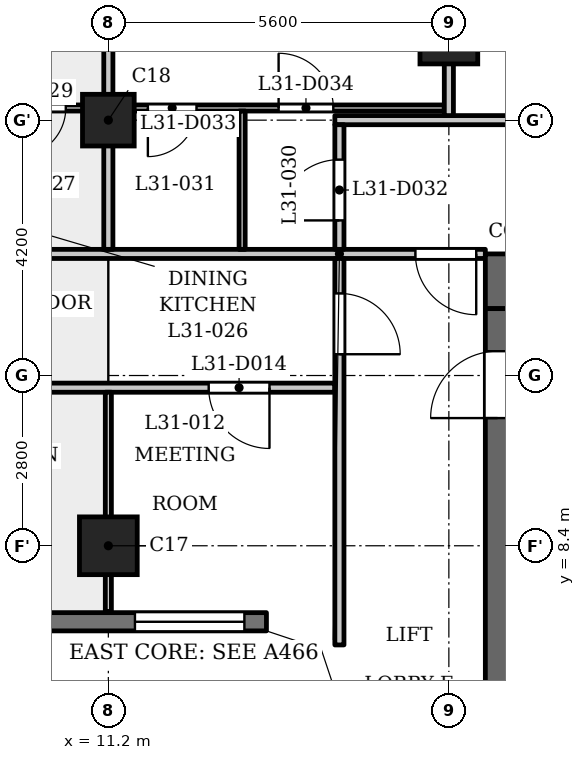
"""IFC4 building model, lengths in metres.
Left out: names, types, materials, properties, quantities, classifications, styles, units other than length and angle.
Written with IfcOpenShell. Run it as: python <this file> out.ifc"""

import sys

from ifc_helpers import new_model, si_unit, direction, frame, frame_2d, origin, origin_2d, place, context, subcontext, project, spatial, polyline, rectangle, outline, extrude, element, fill, save


model = new_model("IFC4")
c1 = context("Model", 3, precision=1e-05, world=origin(), true_north=direction((0.0, 1.0)))
c2 = subcontext(c1, "Body", "Model", "MODEL_VIEW")
j1 = project(units=[si_unit("LENGTHUNIT", "METRE"), si_unit("PLANEANGLEUNIT", "RADIAN")], contexts=[c1])
p1 = place(None, origin())
s1 = spatial("IfcSite", under=j1, at=p1, CompositionType="ELEMENT")
p2 = place(p1, origin())
s2 = spatial("IfcBuilding", under=s1, at=p2, CompositionType="ELEMENT")
p3 = place(p2, frame((0.0, 0.0, 121.8)))
s3 = spatial("IfcBuildingStorey", under=s2, at=p3, CompositionType="ELEMENT", Elevation=121.8)
for number, where, z_axis, x_axis in (
    (1, (11.2, 8.4, 0.0), (0.0, 0.0, 1.0), (1.0, 0.0, 0.0)),
    (2, (16.8, 16.8, 0.0), (0.0, 0.0, 1.0), (1.0, 0.0, 0.0)),
):
    element("IfcColumn", number, at=place(p3, frame(where, z_axis=z_axis, x_axis=x_axis)), inside=s3, PredefinedType="COLUMN", context=c2, shape_type="SweptSolid", body=[
        extrude(rectangle(XDim=0.95, YDim=0.95, at=origin_2d()), origin(), (0.0, 0.0, 1.0), 3.5),
    ])
p4 = place(p3, frame((11.2, 15.4, 0.0), z_axis=(0.0, 0.0, 1.0), x_axis=(1.0, 0.0, 0.0)))
e3 = element("IfcColumn", 3, at=p4, inside=s3, PredefinedType="COLUMN", context=c2, shape_type="SweptSolid", body=[
    extrude(rectangle(XDim=0.85, YDim=0.85, at=origin_2d()), origin(), (0.0, 0.0, 1.0), 3.5),
])
p5 = place(p3, frame((-13.8, 7.15, 0.0), z_axis=(0.0, 0.0, 1.0), x_axis=(1.0, 0.0, 0.0)))
e4 = element("IfcWall", 4, at=p5, inside=s3, PredefinedType="SOLIDWALL", context=c2, shape_type="SweptSolid", body=[
    extrude(rectangle(XDim=27.6, YDim=0.3, at=frame_2d((13.8, 0.0))), origin(), (0.0, 0.0, 1.0), 3.15),
])
p6 = place(p5, frame((0.363, 0.0, 0.9)))
e5 = element("IfcOpeningElement", 5, at=p6, cuts=e4, PredefinedType="OPENING", context=c2, shape_type="SweptSolid", body=[
    extrude(rectangle(XDim=1.8, YDim=1.25, at=frame_2d((0.9, 0.625))), frame((0.0, 0.16, 0.0), z_axis=(0.0, -1.0, 0.0), x_axis=(1.0, 0.0, 0.0)), (0.0, 0.0, 1.0), 0.32),
])
p7 = place(p5, frame((3.6, 0.0, 1.2)))
e6 = element("IfcOpeningElement", 6, at=p7, cuts=e4, PredefinedType="OPENING", context=c2, shape_type="SweptSolid", body=[
    extrude(rectangle(XDim=3.6, YDim=0.95, at=frame_2d((1.8, 0.475))), frame((0.0, 0.16, 0.0), z_axis=(0.0, -1.0, 0.0), x_axis=(1.0, 0.0, 0.0)), (0.0, 0.0, 1.0), 0.32),
])
p8 = place(p5, frame((9.2, 0.0, 1.2)))
e7 = element("IfcOpeningElement", 7, at=p8, cuts=e4, PredefinedType="OPENING", context=c2, shape_type="SweptSolid", body=[
    extrude(rectangle(XDim=3.6, YDim=0.95, at=frame_2d((1.8, 0.475))), frame((0.0, 0.16, 0.0), z_axis=(0.0, -1.0, 0.0), x_axis=(1.0, 0.0, 0.0)), (0.0, 0.0, 1.0), 0.32),
])
p9 = place(p5, frame((14.8, 0.0, 1.2)))
e8 = element("IfcOpeningElement", 8, at=p9, cuts=e4, PredefinedType="OPENING", context=c2, shape_type="SweptSolid", body=[
    extrude(rectangle(XDim=3.6, YDim=0.95, at=frame_2d((1.8, 0.475))), frame((0.0, 0.16, 0.0), z_axis=(0.0, -1.0, 0.0), x_axis=(1.0, 0.0, 0.0)), (0.0, 0.0, 1.0), 0.32),
])
p10 = place(p5, frame((20.4, 0.0, 1.2)))
e9 = element("IfcOpeningElement", 9, at=p10, cuts=e4, PredefinedType="OPENING", context=c2, shape_type="SweptSolid", body=[
    extrude(rectangle(XDim=3.6, YDim=0.95, at=frame_2d((1.8, 0.475))), frame((0.0, 0.16, 0.0), z_axis=(0.0, -1.0, 0.0), x_axis=(1.0, 0.0, 0.0)), (0.0, 0.0, 1.0), 0.32),
])
p11 = place(p5, frame((25.438, 0.0, 0.9)))
e10 = element("IfcOpeningElement", 10, at=p11, cuts=e4, PredefinedType="OPENING", context=c2, shape_type="SweptSolid", body=[
    extrude(rectangle(XDim=1.8, YDim=1.25, at=frame_2d((0.9, 0.625))), frame((0.0, 0.16, 0.0), z_axis=(0.0, -1.0, 0.0), x_axis=(1.0, 0.0, 0.0)), (0.0, 0.0, 1.0), 0.32),
])
p12 = place(p3, frame((17.4, 12.75, 0.0), z_axis=(0.0, 0.0, 1.0), x_axis=(1.0, 0.0, 0.0)))
e11 = element("IfcWall", 11, at=p12, inside=s3, PredefinedType="SHEAR", context=c2, shape_type="SweptSolid", body=[
    extrude(rectangle(XDim=10.4, YDim=0.9, at=frame_2d((5.2, 0.0))), origin(), (0.0, 0.0, 1.0), 3.15),
])
p13 = place(p3, frame((17.6, -12.3, 0.0), z_axis=(0.0, 0.0, 1.0), x_axis=(0.0, 1.0, 0.0)))
e12 = element("IfcWall", 12, at=p13, inside=s3, PredefinedType="SHEAR", context=c2, shape_type="SweptSolid", body=[
    extrude(rectangle(XDim=24.6, YDim=0.4, at=frame_2d((12.3, 0.0))), origin(), (0.0, 0.0, 1.0), 3.15),
])
p14 = place(p13, frame((6.0, 0.0, 0.0)))
e13 = element("IfcOpeningElement", 13, at=p14, cuts=e12, PredefinedType="OPENING", context=c2, shape_type="SweptSolid", body=[
    extrude(rectangle(XDim=1.1, YDim=2.1, at=frame_2d((0.55, 1.05))), frame((0.0, 0.21, 0.0), z_axis=(0.0, -1.0, 0.0), x_axis=(1.0, 0.0, 0.0)), (0.0, 0.0, 1.0), 0.42),
])
p15 = place(p13, frame((8.4, 0.0, 0.0)))
e14 = element("IfcOpeningElement", 14, at=p15, cuts=e12, PredefinedType="OPENING", context=c2, shape_type="SweptSolid", body=[
    extrude(rectangle(XDim=1.1, YDim=2.1, at=frame_2d((0.55, 1.05))), frame((0.0, 0.21, 0.0), z_axis=(0.0, -1.0, 0.0), x_axis=(1.0, 0.0, 0.0)), (0.0, 0.0, 1.0), 0.42),
])
p16 = place(p13, frame((10.8, 0.0, 0.0)))
e15 = element("IfcOpeningElement", 15, at=p16, cuts=e12, PredefinedType="OPENING", context=c2, shape_type="SweptSolid", body=[
    extrude(rectangle(XDim=1.1, YDim=2.1, at=frame_2d((0.55, 1.05))), frame((0.0, 0.21, 0.0), z_axis=(0.0, -1.0, 0.0), x_axis=(1.0, 0.0, 0.0)), (0.0, 0.0, 1.0), 0.42),
])
p17 = place(p13, frame((22.8, 0.0, 0.0)))
e16 = element("IfcOpeningElement", 16, at=p17, cuts=e12, PredefinedType="OPENING", context=c2, shape_type="SweptSolid", body=[
    extrude(rectangle(XDim=1.1, YDim=2.1, at=frame_2d((0.55, 1.05))), frame((0.0, 0.21, 0.0), z_axis=(0.0, -1.0, 0.0), x_axis=(1.0, 0.0, 0.0)), (0.0, 0.0, 1.0), 0.42),
])
p18 = place(p13, frame((0.7, 0.0, 0.0)))
e17 = element("IfcOpeningElement", 17, at=p18, cuts=e12, PredefinedType="OPENING", context=c2, shape_type="SweptSolid", body=[
    extrude(rectangle(XDim=1.1, YDim=2.1, at=frame_2d((0.55, 1.05))), frame((0.0, 0.21, 0.0), z_axis=(0.0, -1.0, 0.0), x_axis=(1.0, 0.0, 0.0)), (0.0, 0.0, 1.0), 0.42),
])
p19 = place(p13, frame((12.775, 0.0, 0.0)))
e18 = element("IfcOpeningElement", 18, at=p19, cuts=e12, PredefinedType="OPENING", context=c2, shape_type="SweptSolid", body=[
    extrude(rectangle(XDim=1.8, YDim=2.1, at=frame_2d((0.9, 1.05))), frame((0.0, 0.21, 0.0), z_axis=(0.0, -1.0, 0.0), x_axis=(1.0, 0.0, 0.0)), (0.0, 0.0, 1.0), 0.42),
])
p20 = place(p3, frame((-14.925, 11.0, 0.0), z_axis=(0.0, 0.0, 1.0), x_axis=(1.0, 0.0, 0.0)))
e19 = element("IfcWall", 19, at=p20, inside=s3, PredefinedType="PARTITIONING", context=c2, shape_type="SweptSolid", body=[
    extrude(rectangle(XDim=29.85, YDim=0.15, at=frame_2d((14.925, 0.0))), origin(), (0.0, 0.0, 1.0), 3.15),
])
p21 = place(p20, frame((1.076, 0.0, 0.0)))
e20 = element("IfcOpeningElement", 20, at=p21, cuts=e19, PredefinedType="OPENING", context=c2, shape_type="SweptSolid", body=[
    extrude(rectangle(XDim=1.0, YDim=2.1, at=frame_2d((0.5, 1.05))), frame((0.0, 0.085, 0.0), z_axis=(0.0, -1.0, 0.0), x_axis=(1.0, 0.0, 0.0)), (0.0, 0.0, 1.0), 0.17),
])
p22 = place(p20, frame((7.625, 0.0, 0.0)))
e21 = element("IfcOpeningElement", 21, at=p22, cuts=e19, PredefinedType="OPENING", context=c2, shape_type="SweptSolid", body=[
    extrude(rectangle(XDim=1.0, YDim=2.1, at=frame_2d((0.5, 1.05))), frame((0.0, 0.085, 0.0), z_axis=(0.0, -1.0, 0.0), x_axis=(1.0, 0.0, 0.0)), (0.0, 0.0, 1.0), 0.17),
])
p23 = place(p20, frame((9.975, 0.0, 0.0)))
e22 = element("IfcOpeningElement", 22, at=p23, cuts=e19, PredefinedType="OPENING", context=c2, shape_type="SweptSolid", body=[
    extrude(rectangle(XDim=1.0, YDim=2.1, at=frame_2d((0.5, 1.05))), frame((0.0, 0.085, 0.0), z_axis=(0.0, -1.0, 0.0), x_axis=(1.0, 0.0, 0.0)), (0.0, 0.0, 1.0), 0.17),
])
p24 = place(p20, frame((18.825, 0.0, 0.0)))
e23 = element("IfcOpeningElement", 23, at=p24, cuts=e19, PredefinedType="OPENING", context=c2, shape_type="SweptSolid", body=[
    extrude(rectangle(XDim=1.0, YDim=2.1, at=frame_2d((0.5, 1.05))), frame((0.0, 0.085, 0.0), z_axis=(0.0, -1.0, 0.0), x_axis=(1.0, 0.0, 0.0)), (0.0, 0.0, 1.0), 0.17),
])
p25 = place(p20, frame((21.175, 0.0, 0.0)))
e24 = element("IfcOpeningElement", 24, at=p25, cuts=e19, PredefinedType="OPENING", context=c2, shape_type="SweptSolid", body=[
    extrude(rectangle(XDim=1.0, YDim=2.1, at=frame_2d((0.5, 1.05))), frame((0.0, 0.085, 0.0), z_axis=(0.0, -1.0, 0.0), x_axis=(1.0, 0.0, 0.0)), (0.0, 0.0, 1.0), 0.17),
])
p26 = place(p20, frame((27.775, 0.0, 0.0)))
e25 = element("IfcOpeningElement", 25, at=p26, cuts=e19, PredefinedType="OPENING", context=c2, shape_type="SweptSolid", body=[
    extrude(rectangle(XDim=1.0, YDim=2.1, at=frame_2d((0.5, 1.05))), frame((0.0, 0.085, 0.0), z_axis=(0.0, -1.0, 0.0), x_axis=(1.0, 0.0, 0.0)), (0.0, 0.0, 1.0), 0.17),
])
p27 = place(p3, frame((-17.4, 13.2, 0.0), z_axis=(0.0, 0.0, 1.0), x_axis=(1.0, 0.0, 0.0)))
e26 = element("IfcWall", 26, at=p27, inside=s3, PredefinedType="PARTITIONING", context=c2, shape_type="SweptSolid", body=[
    extrude(rectangle(XDim=34.8, YDim=0.15, at=frame_2d((17.4, 0.0))), origin(), (0.0, 0.0, 1.0), 3.15),
])
p28 = place(p27, frame((0.25, 0.0, 0.0)))
e27 = element("IfcOpeningElement", 27, at=p28, cuts=e26, PredefinedType="OPENING", context=c2, shape_type="SweptSolid", body=[
    extrude(rectangle(XDim=1.0, YDim=2.1, at=frame_2d((0.5, 1.05))), frame((0.0, 0.085, 0.0), z_axis=(0.0, -1.0, 0.0), x_axis=(1.0, 0.0, 0.0)), (0.0, 0.0, 1.0), 0.17),
])
p29 = place(p27, frame((33.65, 0.0, 0.0)))
e28 = element("IfcOpeningElement", 28, at=p29, cuts=e26, PredefinedType="OPENING", context=c2, shape_type="SweptSolid", body=[
    extrude(rectangle(XDim=1.0, YDim=2.1, at=frame_2d((0.5, 1.05))), frame((0.0, 0.085, 0.0), z_axis=(0.0, -1.0, 0.0), x_axis=(1.0, 0.0, 0.0)), (0.0, 0.0, 1.0), 0.17),
])
p30 = place(p27, frame((15.75, 0.0, 0.0)))
e29 = element("IfcOpeningElement", 29, at=p30, cuts=e26, PredefinedType="OPENING", context=c2, shape_type="SweptSolid", body=[
    extrude(rectangle(XDim=1.0, YDim=2.1, at=frame_2d((0.5, 1.05))), frame((0.0, 0.085, 0.0), z_axis=(0.0, -1.0, 0.0), x_axis=(1.0, 0.0, 0.0)), (0.0, 0.0, 1.0), 0.17),
])
p31 = place(p27, frame((18.1, 0.0, 0.0)))
e30 = element("IfcOpeningElement", 30, at=p31, cuts=e26, PredefinedType="OPENING", context=c2, shape_type="SweptSolid", body=[
    extrude(rectangle(XDim=1.0, YDim=2.1, at=frame_2d((0.5, 1.05))), frame((0.0, 0.085, 0.0), z_axis=(0.0, -1.0, 0.0), x_axis=(1.0, 0.0, 0.0)), (0.0, 0.0, 1.0), 0.17),
])
p32 = place(p27, frame((23.55, 0.0, 0.0)))
e31 = element("IfcOpeningElement", 31, at=p32, cuts=e26, PredefinedType="OPENING", context=c2, shape_type="SweptSolid", body=[
    extrude(rectangle(XDim=1.0, YDim=2.1, at=frame_2d((0.5, 1.05))), frame((0.0, 0.085, 0.0), z_axis=(0.0, -1.0, 0.0), x_axis=(1.0, 0.0, 0.0)), (0.0, 0.0, 1.0), 0.17),
])
p33 = place(p3, frame((14.925, 15.4, 0.0), z_axis=(0.0, 0.0, 1.0), x_axis=(1.0, 0.0, 0.0)))
e32 = element("IfcWall", 32, at=p33, inside=s3, PredefinedType="PARTITIONING", context=c2, shape_type="SweptSolid", body=[
    extrude(rectangle(XDim=12.559, YDim=0.15, at=frame_2d((6.279, 0.0))), origin(), (0.0, 0.0, 1.0), 3.15),
])
p34 = place(p33, frame((5.825, 0.0, 0.0)))
e33 = element("IfcOpeningElement", 33, at=p34, cuts=e32, PredefinedType="OPENING", context=c2, shape_type="SweptSolid", body=[
    extrude(rectangle(XDim=1.0, YDim=2.1, at=frame_2d((0.5, 1.05))), frame((0.0, 0.085, 0.0), z_axis=(0.0, -1.0, 0.0), x_axis=(1.0, 0.0, 0.0)), (0.0, 0.0, 1.0), 0.17),
])
p35 = place(p3, frame((-16.725, 15.6, 0.0), z_axis=(0.0, 0.0, 1.0), x_axis=(1.0, 0.0, 0.0)))
e34 = element("IfcWall", 34, at=p35, inside=s3, PredefinedType="PARTITIONING", context=c2, shape_type="SweptSolid", body=[
    extrude(rectangle(XDim=33.45, YDim=0.1, at=frame_2d((16.725, 0.0))), origin(), (0.0, 0.0, 1.0), 3.15),
])
p36 = place(p35, frame((9.425, 0.0, 0.0)))
e35 = element("IfcOpeningElement", 35, at=p36, cuts=e34, PredefinedType="OPENING", context=c2, shape_type="SweptSolid", body=[
    extrude(rectangle(XDim=0.8, YDim=2.1, at=frame_2d((0.4, 1.05))), frame((0.0, 0.06, 0.0), z_axis=(0.0, -1.0, 0.0), x_axis=(1.0, 0.0, 0.0)), (0.0, 0.0, 1.0), 0.12),
])
p37 = place(p35, frame((6.975, 0.0, 0.0)))
e36 = element("IfcOpeningElement", 36, at=p37, cuts=e34, PredefinedType="OPENING", context=c2, shape_type="SweptSolid", body=[
    extrude(rectangle(XDim=0.9, YDim=2.1, at=frame_2d((0.45, 1.05))), frame((0.0, 0.06, 0.0), z_axis=(0.0, -1.0, 0.0), x_axis=(1.0, 0.0, 0.0)), (0.0, 0.0, 1.0), 0.12),
])
p38 = place(p35, frame((1.875, 0.0, 0.0)))
e37 = element("IfcOpeningElement", 37, at=p38, cuts=e34, PredefinedType="OPENING", context=c2, shape_type="SweptSolid", body=[
    extrude(rectangle(XDim=0.9, YDim=2.1, at=frame_2d((0.45, 1.05))), frame((0.0, 0.06, 0.0), z_axis=(0.0, -1.0, 0.0), x_axis=(1.0, 0.0, 0.0)), (0.0, 0.0, 1.0), 0.12),
])
p39 = place(p35, frame((3.475, 0.0, 0.0)))
e38 = element("IfcOpeningElement", 38, at=p39, cuts=e34, PredefinedType="OPENING", context=c2, shape_type="SweptSolid", body=[
    extrude(rectangle(XDim=0.9, YDim=2.1, at=frame_2d((0.45, 1.05))), frame((0.0, 0.06, 0.0), z_axis=(0.0, -1.0, 0.0), x_axis=(1.0, 0.0, 0.0)), (0.0, 0.0, 1.0), 0.12),
])
p40 = place(p35, frame((11.775, 0.0, 0.0)))
e39 = element("IfcOpeningElement", 39, at=p40, cuts=e34, PredefinedType="OPENING", context=c2, shape_type="SweptSolid", body=[
    extrude(rectangle(XDim=0.8, YDim=2.1, at=frame_2d((0.4, 1.05))), frame((0.0, 0.06, 0.0), z_axis=(0.0, -1.0, 0.0), x_axis=(1.0, 0.0, 0.0)), (0.0, 0.0, 1.0), 0.12),
])
p41 = place(p35, frame((14.175, 0.0, 0.0)))
e40 = element("IfcOpeningElement", 40, at=p41, cuts=e34, PredefinedType="OPENING", context=c2, shape_type="SweptSolid", body=[
    extrude(rectangle(XDim=0.9, YDim=2.1, at=frame_2d((0.45, 1.05))), frame((0.0, 0.06, 0.0), z_axis=(0.0, -1.0, 0.0), x_axis=(1.0, 0.0, 0.0)), (0.0, 0.0, 1.0), 0.12),
])
p42 = place(p35, frame((20.725, 0.0, 0.0)))
e41 = element("IfcOpeningElement", 41, at=p42, cuts=e34, PredefinedType="OPENING", context=c2, shape_type="SweptSolid", body=[
    extrude(rectangle(XDim=0.8, YDim=2.1, at=frame_2d((0.4, 1.05))), frame((0.0, 0.06, 0.0), z_axis=(0.0, -1.0, 0.0), x_axis=(1.0, 0.0, 0.0)), (0.0, 0.0, 1.0), 0.12),
])
p43 = place(p35, frame((18.375, 0.0, 0.0)))
e42 = element("IfcOpeningElement", 42, at=p43, cuts=e34, PredefinedType="OPENING", context=c2, shape_type="SweptSolid", body=[
    extrude(rectangle(XDim=0.9, YDim=2.1, at=frame_2d((0.45, 1.05))), frame((0.0, 0.06, 0.0), z_axis=(0.0, -1.0, 0.0), x_axis=(1.0, 0.0, 0.0)), (0.0, 0.0, 1.0), 0.12),
])
p44 = place(p35, frame((26.425, 0.0, 0.0)))
e43 = element("IfcOpeningElement", 43, at=p44, cuts=e34, PredefinedType="OPENING", context=c2, shape_type="SweptSolid", body=[
    extrude(rectangle(XDim=0.8, YDim=2.1, at=frame_2d((0.4, 1.05))), frame((0.0, 0.06, 0.0), z_axis=(0.0, -1.0, 0.0), x_axis=(1.0, 0.0, 0.0)), (0.0, 0.0, 1.0), 0.12),
])
p45 = place(p35, frame((23.875, 0.0, 0.0)))
e44 = element("IfcOpeningElement", 44, at=p45, cuts=e34, PredefinedType="OPENING", context=c2, shape_type="SweptSolid", body=[
    extrude(rectangle(XDim=0.9, YDim=2.1, at=frame_2d((0.45, 1.05))), frame((0.0, 0.06, 0.0), z_axis=(0.0, -1.0, 0.0), x_axis=(1.0, 0.0, 0.0)), (0.0, 0.0, 1.0), 0.12),
])
p46 = place(p35, frame((28.575, 0.0, 0.0)))
e45 = element("IfcOpeningElement", 45, at=p46, cuts=e34, PredefinedType="OPENING", context=c2, shape_type="SweptSolid", body=[
    extrude(rectangle(XDim=0.8, YDim=2.1, at=frame_2d((0.4, 1.05))), frame((0.0, 0.06, 0.0), z_axis=(0.0, -1.0, 0.0), x_axis=(1.0, 0.0, 0.0)), (0.0, 0.0, 1.0), 0.12),
])
p47 = place(p35, frame((30.725, 0.0, 0.0)))
e46 = element("IfcOpeningElement", 46, at=p47, cuts=e34, PredefinedType="OPENING", context=c2, shape_type="SweptSolid", body=[
    extrude(rectangle(XDim=0.9, YDim=2.1, at=frame_2d((0.45, 1.05))), frame((0.0, 0.06, 0.0), z_axis=(0.0, -1.0, 0.0), x_axis=(1.0, 0.0, 0.0)), (0.0, 0.0, 1.0), 0.12),
])
p48 = place(p3, frame((11.2, 7.32, 0.0), z_axis=(0.0, 0.0, 1.0), x_axis=(0.0, 1.0, 0.0)))
e47 = element("IfcWall", 47, at=p48, inside=s3, PredefinedType="PARTITIONING", context=c2, shape_type="SweptSolid", body=[
    extrude(rectangle(XDim=3.605, YDim=0.1, at=frame_2d((1.802, 0.0))), origin(), (0.0, 0.0, 1.0), 3.15),
])
p49 = place(p3, frame((11.2, 13.275, 0.0), z_axis=(0.0, 0.0, 1.0), x_axis=(0.0, 1.0, 0.0)))
e48 = element("IfcWall", 48, at=p49, inside=s3, PredefinedType="PARTITIONING", context=c2, shape_type="SweptSolid", body=[
    extrude(rectangle(XDim=2.275, YDim=0.15, at=frame_2d((1.138, 0.0))), origin(), (0.0, 0.0, 1.0), 3.15),
])
p50 = place(p3, frame((11.2, 15.65, 0.0), z_axis=(0.0, 0.0, 1.0), x_axis=(0.0, 1.0, 0.0)))
e49 = element("IfcWall", 49, at=p50, inside=s3, PredefinedType="PARTITIONING", context=c2, shape_type="SweptSolid", body=[
    extrude(rectangle(XDim=7.33, YDim=0.15, at=frame_2d((3.665, 0.0))), origin(), (0.0, 0.0, 1.0), 3.15),
])
p51 = place(p3, frame((13.4, 13.275, 0.0), z_axis=(0.0, 0.0, 1.0), x_axis=(0.0, 1.0, 0.0)))
e50 = element("IfcWall", 50, at=p51, inside=s3, PredefinedType="PARTITIONING", context=c2, shape_type="SweptSolid", body=[
    extrude(rectangle(XDim=2.275, YDim=0.1, at=frame_2d((1.138, 0.0))), origin(), (0.0, 0.0, 1.0), 3.15),
])
p52 = place(p3, frame((15.0, 6.769, 0.0), z_axis=(0.0, 0.0, 1.0), x_axis=(0.0, 1.0, 0.0)))
e51 = element("IfcWall", 51, at=p52, inside=s3, PredefinedType="PARTITIONING", context=c2, shape_type="SweptSolid", body=[
    extrude(rectangle(XDim=6.356, YDim=0.15, at=frame_2d((3.178, 0.0))), origin(), (0.0, 0.0, 1.0), 3.15),
])
p53 = place(p52, frame((4.781, 0.0, 0.0)))
e52 = element("IfcOpeningElement", 52, at=p53, cuts=e51, PredefinedType="OPENING", context=c2, shape_type="SweptSolid", body=[
    extrude(rectangle(XDim=1.0, YDim=2.1, at=frame_2d((0.5, 1.05))), frame((0.0, 0.085, 0.0), z_axis=(0.0, -1.0, 0.0), x_axis=(1.0, 0.0, 0.0)), (0.0, 0.0, 1.0), 0.17),
])
p54 = place(p3, frame((15.0, 13.275, 0.0), z_axis=(0.0, 0.0, 1.0), x_axis=(0.0, 1.0, 0.0)))
e53 = element("IfcWall", 53, at=p54, inside=s3, PredefinedType="PARTITIONING", context=c2, shape_type="SweptSolid", body=[
    extrude(rectangle(XDim=2.05, YDim=0.15, at=frame_2d((1.025, 0.0))), origin(), (0.0, 0.0, 1.0), 3.15),
])
p55 = place(p54, frame((0.476, 0.0, 0.0)))
e54 = element("IfcOpeningElement", 54, at=p55, cuts=e53, PredefinedType="OPENING", context=c2, shape_type="SweptSolid", body=[
    extrude(rectangle(XDim=1.0, YDim=2.1, at=frame_2d((0.5, 1.05))), frame((0.0, 0.085, 0.0), z_axis=(0.0, -1.0, 0.0), x_axis=(1.0, 0.0, 0.0)), (0.0, 0.0, 1.0), 0.17),
])
p56 = place(p3, frame((16.8, 15.475, 0.0), z_axis=(0.0, 0.0, 1.0), x_axis=(0.0, 1.0, 0.0)))
e55 = element("IfcWall", 55, at=p56, inside=s3, PredefinedType="PARTITIONING", context=c2, shape_type="SweptSolid", body=[
    extrude(rectangle(XDim=7.505, YDim=0.15, at=frame_2d((3.752, 0.0))), origin(), (0.0, 0.0, 1.0), 3.15),
])
p57 = place(p3, origin())
e56 = element("IfcWall", 56, at=p57, inside=s3, PredefinedType="SOLIDWALL", context=c2, shape_type="SweptSolid", body=[
    extrude(outline(polyline([(14.937, 6.937), (13.849, 7.3), (13.8, 7.3), (13.8, 7.0), (14.7, 6.7), (15.0, 5.8), (15.3, 5.8), (15.3, 5.849), (14.937, 6.937)])), origin(), (0.0, 0.0, 1.0), 3.15),
])
p58 = place(p17, origin())
e57 = element("IfcDoor", 57, at=p58, inside=s3, OperationType="SINGLE_SWING_RIGHT", PredefinedType="DOOR", context=c2, shape_type="SweptSolid", body=[
    extrude(rectangle(XDim=1.1, YDim=2.1, at=frame_2d((0.55, 1.05))), frame((0.0, 0.025, 0.0), z_axis=(0.0, -1.0, 0.0), x_axis=(1.0, 0.0, 0.0)), (0.0, 0.0, 1.0), 0.05),
])
fill(e16, e57)
p59 = place(p53, origin())
e58 = element("IfcDoor", 58, at=p59, inside=s3, OperationType="SINGLE_SWING_LEFT", PredefinedType="DOOR", context=c2, shape_type="SweptSolid", body=[
    extrude(rectangle(XDim=1.0, YDim=2.1, at=frame_2d((0.5, 1.05))), frame((0.0, 0.025, 0.0), z_axis=(0.0, -1.0, 0.0), x_axis=(1.0, 0.0, 0.0)), (0.0, 0.0, 1.0), 0.05),
])
fill(e52, e58)
p60 = place(p29, origin())
e59 = element("IfcDoor", 59, at=p60, inside=s3, OperationType="SINGLE_SWING_RIGHT", PredefinedType="DOOR", context=c2, shape_type="SweptSolid", body=[
    extrude(rectangle(XDim=1.0, YDim=2.1, at=frame_2d((0.5, 1.05))), frame((0.0, 0.025, 0.0), z_axis=(0.0, -1.0, 0.0), x_axis=(1.0, 0.0, 0.0)), (0.0, 0.0, 1.0), 0.05),
])
fill(e28, e59)
p61 = place(p26, origin())
e60 = element("IfcDoor", 60, at=p61, inside=s3, OperationType="SINGLE_SWING_RIGHT", PredefinedType="DOOR", context=c2, shape_type="SweptSolid", body=[
    extrude(rectangle(XDim=1.0, YDim=2.1, at=frame_2d((0.5, 1.05))), frame((0.0, 0.025, 0.0), z_axis=(0.0, -1.0, 0.0), x_axis=(1.0, 0.0, 0.0)), (0.0, 0.0, 1.0), 0.05),
])
fill(e25, e60)
p62 = place(p44, origin())
e61 = element("IfcDoor", 61, at=p62, inside=s3, OperationType="SINGLE_SWING_LEFT", PredefinedType="DOOR", context=c2, shape_type="SweptSolid", body=[
    extrude(rectangle(XDim=0.8, YDim=2.1, at=frame_2d((0.4, 1.05))), frame((0.0, 0.025, 0.0), z_axis=(0.0, -1.0, 0.0), x_axis=(1.0, 0.0, 0.0)), (0.0, 0.0, 1.0), 0.05),
])
fill(e43, e61)
p63 = place(p55, origin())
e62 = element("IfcDoor", 62, at=p63, inside=s3, OperationType="SINGLE_SWING_RIGHT", PredefinedType="DOOR", context=c2, shape_type="SweptSolid", body=[
    extrude(rectangle(XDim=1.0, YDim=2.1, at=frame_2d((0.5, 1.05))), frame((0.0, 0.025, 0.0), z_axis=(0.0, -1.0, 0.0), x_axis=(1.0, 0.0, 0.0)), (0.0, 0.0, 1.0), 0.05),
])
fill(e54, e62)
p64 = place(p46, origin())
e63 = element("IfcDoor", 63, at=p64, inside=s3, OperationType="SINGLE_SWING_LEFT", PredefinedType="DOOR", context=c2, shape_type="SweptSolid", body=[
    extrude(rectangle(XDim=0.8, YDim=2.1, at=frame_2d((0.4, 1.05))), frame((0.0, 0.025, 0.0), z_axis=(0.0, -1.0, 0.0), x_axis=(1.0, 0.0, 0.0)), (0.0, 0.0, 1.0), 0.05),
])
fill(e45, e63)
p65 = place(p47, origin())
e64 = element("IfcDoor", 64, at=p65, inside=s3, OperationType="SINGLE_SWING_RIGHT", PredefinedType="DOOR", context=c2, shape_type="SweptSolid", body=[
    extrude(rectangle(XDim=0.9, YDim=2.1, at=frame_2d((0.45, 1.05))), frame((0.0, 0.025, 0.0), z_axis=(0.0, -1.0, 0.0), x_axis=(1.0, 0.0, 0.0)), (0.0, 0.0, 1.0), 0.05),
])
fill(e46, e64)
p66 = place(p11, origin())
e65 = element("IfcWindow", 65, at=p66, inside=s3, PartitioningType="SINGLE_PANEL", PredefinedType="WINDOW", context=c2, shape_type="SweptSolid", body=[
    extrude(rectangle(XDim=1.8, YDim=1.25, at=frame_2d((0.9, 0.625))), frame((0.0, 0.03, 0.0), z_axis=(0.0, -1.0, 0.0), x_axis=(1.0, 0.0, 0.0)), (0.0, 0.0, 1.0), 0.06),
])
fill(e10, e65)
save(model, sys.argv[1])
